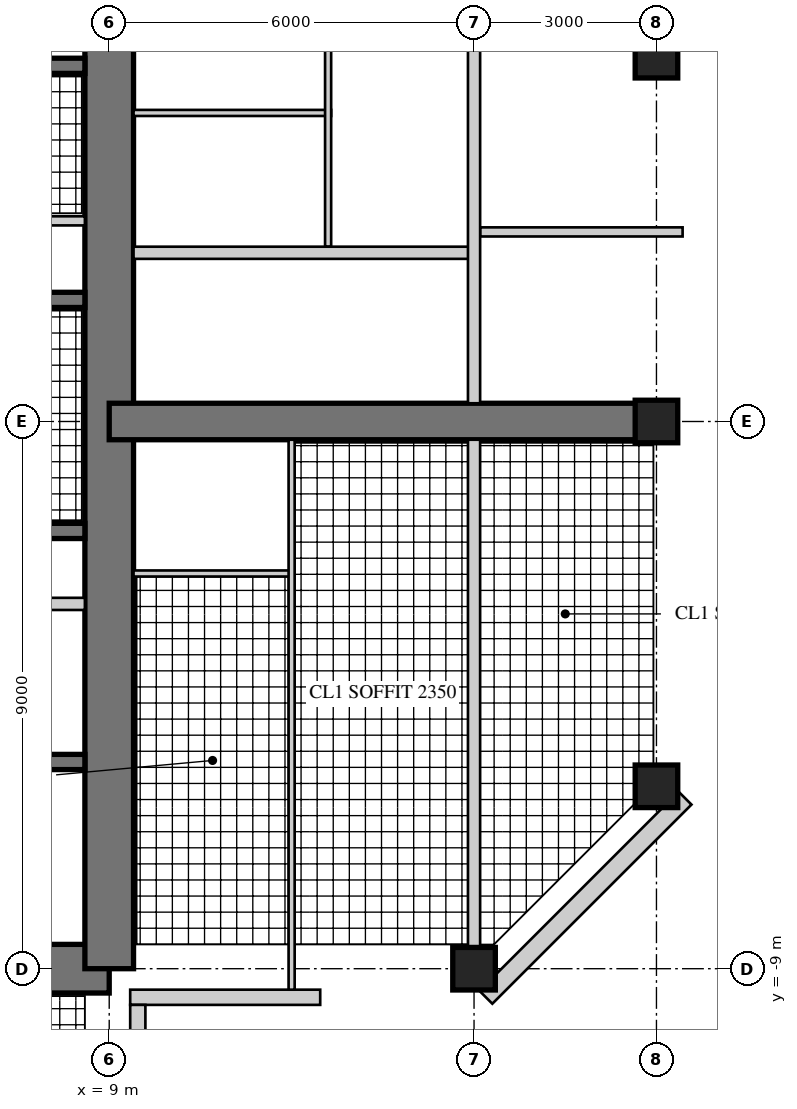
"""IFC4 building model, lengths in metres.
Left out: names, types, materials, properties, quantities, classifications, styles, units other than length and angle.
Written with IfcOpenShell. Run it as: python <this file> out.ifc"""

import sys

from ifc_helpers import new_model, si_unit, direction, frame, frame_2d, origin, origin_2d, place, context, subcontext, project, spatial, rectangle, hollow_rectangle, extrude, element, fill, save


model = new_model("IFC4")
c1 = context("Model", 3, precision=1e-05, world=origin(), true_north=direction((0.0, 1.0)))
c2 = subcontext(c1, "Body", "Model", "MODEL_VIEW")
j1 = project(units=[si_unit("LENGTHUNIT", "METRE"), si_unit("PLANEANGLEUNIT", "RADIAN")], contexts=[c1])
p1 = place(None, origin())
s1 = spatial("IfcSite", under=j1, at=p1, CompositionType="ELEMENT")
p2 = place(p1, origin())
s2 = spatial("IfcBuilding", under=s1, at=p2, CompositionType="ELEMENT")
p3 = place(p2, frame((0.0, 0.0, 278.1)))
s3 = spatial("IfcBuildingStorey", under=s2, at=p3, CompositionType="ELEMENT", Elevation=278.1)
p4 = place(p3, frame((-9.0, -9.0, 0.0), z_axis=(0.0, 0.0, 1.0), x_axis=(1.0, 0.0, 0.0)))
e1 = element("IfcWall", 1, at=p4, inside=s3, PredefinedType="SHEAR", context=c2, shape_type="SweptSolid", body=[
    extrude(rectangle(XDim=18.0, YDim=0.8, at=frame_2d((9.0, 0.0))), origin(), (0.0, 0.0, 1.0), 3.4),
])
p5 = place(p4, frame((9.8, 0.0, 0.0)))
e2 = element("IfcOpeningElement", 2, at=p5, cuts=e1, PredefinedType="OPENING", context=c2, shape_type="SweptSolid", body=[
    extrude(rectangle(XDim=1.0, YDim=2.4, at=frame_2d((0.5, 1.2))), frame((0.0, 0.41, 0.0), z_axis=(0.0, -1.0, 0.0), x_axis=(1.0, 0.0, 0.0)), (0.0, 0.0, 1.0), 0.82),
])
p6 = place(p3, frame((9.0, -9.0, 0.0), z_axis=(0.0, 0.0, 1.0), x_axis=(0.0, 1.0, 0.0)))
e3 = element("IfcWall", 3, at=p6, inside=s3, PredefinedType="SHEAR", context=c2, shape_type="SweptSolid", body=[
    extrude(rectangle(XDim=18.0, YDim=0.8, at=frame_2d((9.0, 0.0))), origin(), (0.0, 0.0, 1.0), 3.4),
])
p7 = place(p6, frame((9.8, 0.0, 0.0)))
e4 = element("IfcOpeningElement", 4, at=p7, cuts=e3, PredefinedType="OPENING", context=c2, shape_type="SweptSolid", body=[
    extrude(rectangle(XDim=1.0, YDim=2.4, at=frame_2d((0.5, 1.2))), frame((0.0, 0.41, 0.0), z_axis=(0.0, -1.0, 0.0), x_axis=(1.0, 0.0, 0.0)), (0.0, 0.0, 1.0), 0.82),
])
p8 = place(p3, frame((1.925, 2.0, 0.0), z_axis=(0.0, 0.0, 1.0), x_axis=(1.0, 0.0, 0.0)))
e5 = element("IfcWall", 5, at=p8, inside=s3, PredefinedType="SHEAR", context=c2, shape_type="SweptSolid", body=[
    extrude(rectangle(XDim=6.675, YDim=0.25, at=frame_2d((3.337, 0.0))), origin(), (0.0, 0.0, 1.0), 3.4),
])
p9 = place(p3, frame((1.925, 5.85, 0.0), z_axis=(0.0, 0.0, 1.0), x_axis=(1.0, 0.0, 0.0)))
e6 = element("IfcWall", 6, at=p9, inside=s3, PredefinedType="SHEAR", context=c2, shape_type="SweptSolid", body=[
    extrude(rectangle(XDim=6.675, YDim=0.25, at=frame_2d((3.337, 0.0))), origin(), (0.0, 0.0, 1.0), 3.4),
])
p10 = place(p9, frame((0.546, 0.0, 0.0)))
e7 = element("IfcOpeningElement", 7, at=p10, cuts=e6, PredefinedType="OPENING", context=c2, shape_type="SweptSolid", body=[
    extrude(rectangle(XDim=1.0, YDim=2.1, at=frame_2d((0.5, 1.05))), frame((0.0, 0.135, 0.0), z_axis=(0.0, -1.0, 0.0), x_axis=(1.0, 0.0, 0.0)), (0.0, 0.0, 1.0), 0.27),
])
p11 = place(p9, frame((5.129, 0.0, 0.0)))
e8 = element("IfcOpeningElement", 8, at=p11, cuts=e6, PredefinedType="OPENING", context=c2, shape_type="SweptSolid", body=[
    extrude(rectangle(XDim=1.0, YDim=2.1, at=frame_2d((0.5, 1.05))), frame((0.0, 0.135, 0.0), z_axis=(0.0, -1.0, 0.0), x_axis=(1.0, 0.0, 0.0)), (0.0, 0.0, 1.0), 0.27),
])
p12 = place(p3, frame((1.925, 3.3, 0.0), z_axis=(0.0, 0.0, 1.0), x_axis=(1.0, 0.0, 0.0)))
e9 = element("IfcWall", 9, at=p12, inside=s3, PredefinedType="PARTITIONING", context=c2, shape_type="SweptSolid", body=[
    extrude(rectangle(XDim=6.675, YDim=0.15, at=frame_2d((3.337, 0.0))), origin(), (0.0, 0.0, 1.0), 3.4),
])
p13 = place(p12, frame((0.075, 0.0, 0.0)))
e10 = element("IfcOpeningElement", 10, at=p13, cuts=e9, PredefinedType="OPENING", context=c2, shape_type="SweptSolid", body=[
    extrude(rectangle(XDim=0.8, YDim=2.1, at=frame_2d((0.4, 1.05))), frame((0.0, 0.085, 0.0), z_axis=(0.0, -1.0, 0.0), x_axis=(1.0, 0.0, 0.0)), (0.0, 0.0, 1.0), 0.17),
])
p14 = place(p12, frame((3.675, 0.0, 0.0)))
e11 = element("IfcOpeningElement", 11, at=p14, cuts=e9, PredefinedType="OPENING", context=c2, shape_type="SweptSolid", body=[
    extrude(rectangle(XDim=0.8, YDim=2.1, at=frame_2d((0.4, 1.05))), frame((0.0, 0.085, 0.0), z_axis=(0.0, -1.0, 0.0), x_axis=(1.0, 0.0, 0.0)), (0.0, 0.0, 1.0), 0.17),
])
p15 = place(p3, frame((2.125, -1.8, 0.0), z_axis=(0.0, 0.0, 1.0), x_axis=(1.0, 0.0, 0.0)))
e12 = element("IfcWall", 12, at=p15, inside=s3, PredefinedType="SHEAR", context=c2, shape_type="SweptSolid", body=[
    extrude(rectangle(XDim=6.475, YDim=0.25, at=frame_2d((3.238, 0.0))), origin(), (0.0, 0.0, 1.0), 3.4),
])
p16 = place(p3, frame((2.125, -5.6, 0.0), z_axis=(0.0, 0.0, 1.0), x_axis=(1.0, 0.0, 0.0)))
e13 = element("IfcWall", 13, at=p16, inside=s3, PredefinedType="SHEAR", context=c2, shape_type="SweptSolid", body=[
    extrude(rectangle(XDim=6.475, YDim=0.25, at=frame_2d((3.238, 0.0))), origin(), (0.0, 0.0, 1.0), 3.4),
])
p17 = place(p16, frame((0.175, 0.0, 0.0)))
e14 = element("IfcOpeningElement", 14, at=p17, cuts=e13, PredefinedType="OPENING", context=c2, shape_type="SweptSolid", body=[
    extrude(rectangle(XDim=1.0, YDim=2.1, at=frame_2d((0.5, 1.05))), frame((0.0, 0.135, 0.0), z_axis=(0.0, -1.0, 0.0), x_axis=(1.0, 0.0, 0.0)), (0.0, 0.0, 1.0), 0.27),
])
p18 = place(p3, frame((5.725, -3.0, 0.0), z_axis=(0.0, 0.0, 1.0), x_axis=(1.0, 0.0, 0.0)))
e15 = element("IfcWall", 15, at=p18, inside=s3, PredefinedType="PARTITIONING", context=c2, shape_type="SweptSolid", body=[
    extrude(rectangle(XDim=2.875, YDim=0.2, at=frame_2d((1.438, 0.0))), origin(), (0.0, 0.0, 1.0), 3.4),
])
p19 = place(p3, frame((9.0, 0.0, 0.0), z_axis=(0.0, 0.0, 1.0), x_axis=(1.0, 0.0, 0.0)))
e16 = element("IfcWall", 16, at=p19, inside=s3, PredefinedType="SHEAR", context=c2, shape_type="SweptSolid", body=[
    extrude(rectangle(XDim=9.0, YDim=0.6, at=frame_2d((4.5, 0.0))), origin(), (0.0, 0.0, 1.0), 3.4),
])
p20 = place(p19, frame((3.8, 0.0, 0.0)))
e17 = element("IfcOpeningElement", 17, at=p20, cuts=e16, PredefinedType="OPENING", context=c2, shape_type="SweptSolid", body=[
    extrude(rectangle(XDim=1.0, YDim=2.15, at=frame_2d((0.5, 1.075))), frame((0.0, 0.31, 0.0), z_axis=(0.0, -1.0, 0.0), x_axis=(1.0, 0.0, 0.0)), (0.0, 0.0, 1.0), 0.62),
])
p21 = place(p19, frame((7.0, 0.0, 0.0)))
e18 = element("IfcOpeningElement", 18, at=p21, cuts=e16, PredefinedType="OPENING", context=c2, shape_type="SweptSolid", body=[
    extrude(rectangle(XDim=1.0, YDim=2.2, at=frame_2d((0.5, 1.1))), frame((0.0, 0.31, 0.0), z_axis=(0.0, -1.0, 0.0), x_axis=(1.0, 0.0, 0.0)), (0.0, 0.0, 1.0), 0.62),
])
for number, where, z_axis, x_axis in (
    (19, (15.0, -9.0, 0.0), (0.0, 0.0, 1.0), (1.0, 0.0, 0.0)),
    (20, (18.0, -6.0, 0.0), (0.0, 0.0, 1.0), (1.0, 0.0, 0.0)),
    (21, (18.0, 0.0, 0.0), (0.0, 0.0, 1.0), (1.0, 0.0, 0.0)),
    (22, (18.0, 6.0, 0.0), (0.0, 0.0, 1.0), (1.0, 0.0, 0.0)),
):
    element("IfcColumn", number, at=place(p3, frame(where, z_axis=z_axis, x_axis=x_axis)), inside=s3, PredefinedType="COLUMN", context=c2, shape_type="SweptSolid", body=[
        extrude(rectangle(XDim=0.7, YDim=0.7, at=origin_2d()), origin(), (0.0, 0.0, 1.0), 3.4),
    ])
p22 = place(p3, frame((9.345, -9.47, 0.0), z_axis=(0.0, 0.0, 1.0), x_axis=(1.0, 0.0, 0.0)))
e23 = element("IfcWall", 23, at=p22, inside=s3, PredefinedType="SOLIDWALL", context=c2, shape_type="SweptSolid", body=[
    extrude(rectangle(XDim=3.125, YDim=0.25, at=frame_2d((1.562, 0.0))), origin(), (0.0, 0.0, 1.0), 3.22),
])
p23 = place(p22, frame((0.6, 0.0, 0.0)))
e24 = element("IfcOpeningElement", 24, at=p23, cuts=e23, PredefinedType="OPENING", context=c2, shape_type="SweptSolid", body=[
    extrude(rectangle(XDim=1.0, YDim=2.2, at=frame_2d((0.5, 1.1))), frame((0.0, 0.135, 0.0), z_axis=(0.0, -1.0, 0.0), x_axis=(1.0, 0.0, 0.0)), (0.0, 0.0, 1.0), 0.27),
])
p24 = place(p3, frame((15.195, -9.47, 0.0), z_axis=(0.0, 0.0, 1.0), x_axis=(0.707106781187, 0.707106781187, 0.0)))
e25 = element("IfcWall", 25, at=p24, inside=s3, PredefinedType="SOLIDWALL", context=c2, shape_type="SweptSolid", body=[
    extrude(rectangle(XDim=4.632, YDim=0.3, at=frame_2d((2.316, 0.0))), origin(), (0.0, 0.0, 1.0), 3.22),
])
p25 = place(p24, frame((1.866, 0.0, 0.3)))
e26 = element("IfcOpeningElement", 26, at=p25, cuts=e25, PredefinedType="OPENING", context=c2, shape_type="SweptSolid", body=[
    extrude(rectangle(XDim=0.9, YDim=2.4, at=frame_2d((0.45, 1.2))), frame((0.0, 0.16, 0.0), z_axis=(0.0, -1.0, 0.0), x_axis=(1.0, 0.0, 0.0)), (0.0, 0.0, 1.0), 0.32),
])
p26 = place(p3, frame((9.47, -12.47, 0.0), z_axis=(0.0, 0.0, 1.0), x_axis=(0.0, 1.0, 0.0)))
e27 = element("IfcWall", 27, at=p26, inside=s3, PredefinedType="SOLIDWALL", context=c2, shape_type="SweptSolid", body=[
    extrude(rectangle(XDim=2.875, YDim=0.25, at=frame_2d((1.438, 0.0))), origin(), (0.0, 0.0, 1.0), 3.22),
])
p27 = place(p26, frame((0.6, 0.0, 0.0)))
e28 = element("IfcOpeningElement", 28, at=p27, cuts=e27, PredefinedType="OPENING", context=c2, shape_type="SweptSolid", body=[
    extrude(rectangle(XDim=1.0, YDim=2.2, at=frame_2d((0.5, 1.1))), frame((0.0, 0.135, 0.0), z_axis=(0.0, -1.0, 0.0), x_axis=(1.0, 0.0, 0.0)), (0.0, 0.0, 1.0), 0.27),
])
p28 = place(p3, frame((9.4, 5.075, 0.0), z_axis=(0.0, 0.0, 1.0), x_axis=(1.0, 0.0, 0.0)))
e29 = element("IfcWall", 29, at=p28, inside=s3, PredefinedType="PARTITIONING", context=c2, shape_type="SweptSolid", body=[
    extrude(rectangle(XDim=3.25, YDim=0.1, at=frame_2d((1.625, 0.0))), origin(), (0.0, 0.0, 1.0), 3.22),
])
p29 = place(p3, frame((12.6, 2.875, 0.0), z_axis=(0.0, 0.0, 1.0), x_axis=(0.0, 1.0, 0.0)))
e30 = element("IfcWall", 30, at=p29, inside=s3, PredefinedType="PARTITIONING", context=c2, shape_type="SweptSolid", body=[
    extrude(rectangle(XDim=6.555, YDim=0.1, at=frame_2d((3.277, 0.0))), origin(), (0.0, 0.0, 1.0), 3.22),
])
p30 = place(p29, frame((0.55, 0.0, 0.0)))
e31 = element("IfcOpeningElement", 31, at=p30, cuts=e30, PredefinedType="OPENING", context=c2, shape_type="SweptSolid", body=[
    extrude(rectangle(XDim=0.9, YDim=2.1, at=frame_2d((0.45, 1.05))), frame((0.0, 0.06, 0.0), z_axis=(0.0, -1.0, 0.0), x_axis=(1.0, 0.0, 0.0)), (0.0, 0.0, 1.0), 0.12),
])
p31 = place(p29, frame((2.65, 0.0, 0.0)))
e32 = element("IfcOpeningElement", 32, at=p31, cuts=e30, PredefinedType="OPENING", context=c2, shape_type="SweptSolid", body=[
    extrude(rectangle(XDim=0.9, YDim=2.1, at=frame_2d((0.45, 1.05))), frame((0.0, 0.06, 0.0), z_axis=(0.0, -1.0, 0.0), x_axis=(1.0, 0.0, 0.0)), (0.0, 0.0, 1.0), 0.12),
])
p32 = place(p3, frame((9.4, -2.5, 0.0), z_axis=(0.0, 0.0, 1.0), x_axis=(1.0, 0.0, 0.0)))
e33 = element("IfcWall", 33, at=p32, inside=s3, PredefinedType="PARTITIONING", context=c2, shape_type="SweptSolid", body=[
    extrude(rectangle(XDim=2.65, YDim=0.1, at=frame_2d((1.325, 0.0))), origin(), (0.0, 0.0, 1.0), 3.22),
])
p33 = place(p3, frame((12.0, -9.345, 0.0), z_axis=(0.0, 0.0, 1.0), x_axis=(0.0, 1.0, 0.0)))
e34 = element("IfcWall", 34, at=p33, inside=s3, PredefinedType="PARTITIONING", context=c2, shape_type="SweptSolid", body=[
    extrude(rectangle(XDim=9.045, YDim=0.1, at=frame_2d((4.522, 0.0))), origin(), (0.0, 0.0, 1.0), 3.22),
])
p34 = place(p33, frame((5.495, 0.0, 0.0)))
e35 = element("IfcOpeningElement", 35, at=p34, cuts=e34, PredefinedType="OPENING", context=c2, shape_type="SweptSolid", body=[
    extrude(rectangle(XDim=0.9, YDim=2.1, at=frame_2d((0.45, 1.05))), frame((0.0, 0.06, 0.0), z_axis=(0.0, -1.0, 0.0), x_axis=(1.0, 0.0, 0.0)), (0.0, 0.0, 1.0), 0.12),
])
p35 = place(p33, frame((7.595, 0.0, 0.0)))
e36 = element("IfcOpeningElement", 36, at=p35, cuts=e34, PredefinedType="OPENING", context=c2, shape_type="SweptSolid", body=[
    extrude(rectangle(XDim=0.9, YDim=2.1, at=frame_2d((0.45, 1.05))), frame((0.0, 0.06, 0.0), z_axis=(0.0, -1.0, 0.0), x_axis=(1.0, 0.0, 0.0)), (0.0, 0.0, 1.0), 0.12),
])
p36 = place(p3, frame((9.4, 2.775, 0.0), z_axis=(0.0, 0.0, 1.0), x_axis=(1.0, 0.0, 0.0)))
e37 = element("IfcWall", 37, at=p36, inside=s3, PredefinedType="SOLIDWALL", context=c2, shape_type="SweptSolid", body=[
    extrude(rectangle(XDim=5.6, YDim=0.2, at=frame_2d((2.8, 0.0))), origin(), (0.0, 0.0, 1.0), 3.22),
])
p37 = place(p36, frame((3.75, 0.0, 0.0)))
e38 = element("IfcOpeningElement", 38, at=p37, cuts=e37, PredefinedType="OPENING", context=c2, shape_type="SweptSolid", body=[
    extrude(rectangle(XDim=1.0, YDim=2.15, at=frame_2d((0.5, 1.075))), frame((0.0, 0.11, 0.0), z_axis=(0.0, -1.0, 0.0), x_axis=(1.0, 0.0, 0.0)), (0.0, 0.0, 1.0), 0.22),
])
p38 = place(p3, frame((15.1, 3.118, 0.0), z_axis=(0.0, 0.0, 1.0), x_axis=(1.0, 0.0, 0.0)))
e39 = element("IfcWall", 39, at=p38, inside=s3, PredefinedType="PARTITIONING", context=c2, shape_type="SweptSolid", body=[
    extrude(rectangle(XDim=3.33, YDim=0.15, at=frame_2d((1.665, 0.0))), origin(), (0.0, 0.0, 1.0), 3.22),
])
p39 = place(p38, frame((0.6, 0.0, 0.0)))
e40 = element("IfcOpeningElement", 40, at=p39, cuts=e39, PredefinedType="OPENING", context=c2, shape_type="SweptSolid", body=[
    extrude(rectangle(XDim=1.0, YDim=2.1, at=frame_2d((0.5, 1.05))), frame((0.0, 0.085, 0.0), z_axis=(0.0, -1.0, 0.0), x_axis=(1.0, 0.0, 0.0)), (0.0, 0.0, 1.0), 0.17),
])
p40 = place(p3, frame((15.0, -8.65, 0.0), z_axis=(0.0, 0.0, 1.0), x_axis=(0.0, 1.0, 0.0)))
e41 = element("IfcWall", 41, at=p40, inside=s3, PredefinedType="SOLIDWALL", context=c2, shape_type="SweptSolid", body=[
    extrude(rectangle(XDim=8.35, YDim=0.2, at=frame_2d((4.175, 0.0))), origin(), (0.0, 0.0, 1.0), 2.52),
])
p41 = place(p3, frame((15.0, 0.3, 0.0), z_axis=(0.0, 0.0, 1.0), x_axis=(0.0, 1.0, 0.0)))
e42 = element("IfcWall", 42, at=p41, inside=s3, PredefinedType="SOLIDWALL", context=c2, shape_type="SweptSolid", body=[
    extrude(rectangle(XDim=8.35, YDim=0.2, at=frame_2d((4.175, 0.0))), origin(), (0.0, 0.0, 1.0), 2.52),
])
p42 = place(p41, frame((0.4, 0.0, 0.0)))
e43 = element("IfcOpeningElement", 43, at=p42, cuts=e42, PredefinedType="OPENING", context=c2, shape_type="SweptSolid", body=[
    extrude(rectangle(XDim=1.0, YDim=2.2, at=frame_2d((0.5, 1.1))), frame((0.0, 0.11, 0.0), z_axis=(0.0, -1.0, 0.0), x_axis=(1.0, 0.0, 0.0)), (0.0, 0.0, 1.0), 0.22),
])
p43 = place(p23, origin())
e44 = element("IfcDoor", 44, at=p43, inside=s3, OperationType="SINGLE_SWING_LEFT", PredefinedType="DOOR", context=c2, shape_type="SweptSolid", body=[
    extrude(hollow_rectangle(XDim=1.0, YDim=2.2, WallThickness=0.06, at=frame_2d((0.5, 1.1))), frame((0.0, 0.025, 0.0), z_axis=(0.0, -1.0, 0.0), x_axis=(1.0, 0.0, 0.0)), (0.0, 0.0, 1.0), 0.05),
    extrude(rectangle(XDim=0.879, YDim=2.079, at=frame_2d((0.5, 1.1))), frame((0.0, 0.025, 0.0), z_axis=(0.0, -1.0, 0.0), x_axis=(1.0, 0.0, 0.0)), (0.0, 0.0, 1.0), 0.05),
])
fill(e24, e44)
p44 = place(p25, origin())
e45 = element("IfcWindow", 45, at=p44, inside=s3, PartitioningType="SINGLE_PANEL", PredefinedType="WINDOW", context=c2, shape_type="SweptSolid", body=[
    extrude(hollow_rectangle(XDim=0.9, YDim=2.4, WallThickness=0.06, at=frame_2d((0.45, 1.2))), frame((0.0, 0.03, 0.0), z_axis=(0.0, -1.0, 0.0), x_axis=(1.0, 0.0, 0.0)), (0.0, 0.0, 1.0), 0.06),
    extrude(rectangle(XDim=0.779, YDim=2.279, at=frame_2d((0.45, 1.2))), frame((0.0, 0.03, 0.0), z_axis=(0.0, -1.0, 0.0), x_axis=(1.0, 0.0, 0.0)), (0.0, 0.0, 1.0), 0.06),
])
fill(e26, e45)
p45 = place(p30, origin())
e46 = element("IfcDoor", 46, at=p45, inside=s3, OperationType="SINGLE_SWING_LEFT", PredefinedType="DOOR", context=c2, shape_type="SweptSolid", body=[
    extrude(rectangle(XDim=0.9, YDim=2.1, at=frame_2d((0.45, 1.05))), frame((0.0, 0.025, 0.0), z_axis=(0.0, -1.0, 0.0), x_axis=(1.0, 0.0, 0.0)), (0.0, 0.0, 1.0), 0.05),
])
fill(e31, e46)
p46 = place(p31, origin())
e47 = element("IfcDoor", 47, at=p46, inside=s3, OperationType="SINGLE_SWING_LEFT", PredefinedType="DOOR", context=c2, shape_type="SweptSolid", body=[
    extrude(rectangle(XDim=0.9, YDim=2.1, at=frame_2d((0.45, 1.05))), frame((0.0, 0.025, 0.0), z_axis=(0.0, -1.0, 0.0), x_axis=(1.0, 0.0, 0.0)), (0.0, 0.0, 1.0), 0.05),
])
fill(e32, e47)
p47 = place(p34, origin())
e48 = element("IfcDoor", 48, at=p47, inside=s3, OperationType="SINGLE_SWING_RIGHT", PredefinedType="DOOR", context=c2, shape_type="SweptSolid", body=[
    extrude(rectangle(XDim=0.9, YDim=2.1, at=frame_2d((0.45, 1.05))), frame((0.0, 0.025, 0.0), z_axis=(0.0, -1.0, 0.0), x_axis=(1.0, 0.0, 0.0)), (0.0, 0.0, 1.0), 0.05),
])
fill(e35, e48)
p48 = place(p35, origin())
e49 = element("IfcDoor", 49, at=p48, inside=s3, OperationType="SINGLE_SWING_RIGHT", PredefinedType="DOOR", context=c2, shape_type="SweptSolid", body=[
    extrude(rectangle(XDim=0.9, YDim=2.1, at=frame_2d((0.45, 1.05))), frame((0.0, 0.025, 0.0), z_axis=(0.0, -1.0, 0.0), x_axis=(1.0, 0.0, 0.0)), (0.0, 0.0, 1.0), 0.05),
])
fill(e36, e49)
p49 = place(p37, origin())
e50 = element("IfcDoor", 50, at=p49, inside=s3, OperationType="SINGLE_SWING_LEFT", PredefinedType="DOOR", context=c2, shape_type="SweptSolid", body=[
    extrude(rectangle(XDim=1.0, YDim=2.15, at=frame_2d((0.5, 1.075))), frame((0.0, 0.025, 0.0), z_axis=(0.0, -1.0, 0.0), x_axis=(1.0, 0.0, 0.0)), (0.0, 0.0, 1.0), 0.05),
])
fill(e38, e50)
p50 = place(p39, frame((1.0, 0.0, 0.0), z_axis=(0.0, 0.0, 1.0), x_axis=(-1.0, 0.0, 0.0)))
e51 = element("IfcDoor", 51, at=p50, inside=s3, OperationType="SINGLE_SWING_RIGHT", PredefinedType="DOOR", context=c2, shape_type="SweptSolid", body=[
    extrude(rectangle(XDim=1.0, YDim=2.1, at=frame_2d((0.5, 1.05))), frame((0.0, 0.025, 0.0), z_axis=(0.0, -1.0, 0.0), x_axis=(1.0, 0.0, 0.0)), (0.0, 0.0, 1.0), 0.05),
])
fill(e40, e51)
p51 = place(p42, frame((1.0, 0.0, 0.0), z_axis=(0.0, 0.0, 1.0), x_axis=(-1.0, 0.0, 0.0)))
e52 = element("IfcDoor", 52, at=p51, inside=s3, OperationType="SINGLE_SWING_LEFT", PredefinedType="DOOR", context=c2, shape_type="SweptSolid", body=[
    extrude(rectangle(XDim=1.0, YDim=2.2, at=frame_2d((0.5, 1.1))), frame((0.0, 0.025, 0.0), z_axis=(0.0, -1.0, 0.0), x_axis=(1.0, 0.0, 0.0)), (0.0, 0.0, 1.0), 0.05),
])
fill(e43, e52)
p52 = place(p20, frame((1.0, 0.0, 0.0), z_axis=(0.0, 0.0, 1.0), x_axis=(-1.0, 0.0, 0.0)))
e53 = element("IfcDoor", 53, at=p52, inside=s3, OperationType="SINGLE_SWING_RIGHT", PredefinedType="DOOR", context=c2, shape_type="SweptSolid", body=[
    extrude(rectangle(XDim=1.0, YDim=2.15, at=frame_2d((0.5, 1.075))), frame((0.0, 0.025, 0.0), z_axis=(0.0, -1.0, 0.0), x_axis=(1.0, 0.0, 0.0)), (0.0, 0.0, 1.0), 0.05),
])
fill(e17, e53)
p53 = place(p21, origin())
e54 = element("IfcDoor", 54, at=p53, inside=s3, OperationType="SINGLE_SWING_LEFT", PredefinedType="DOOR", context=c2, shape_type="SweptSolid", body=[
    extrude(rectangle(XDim=1.0, YDim=2.2, at=frame_2d((0.5, 1.1))), frame((0.0, 0.025, 0.0), z_axis=(0.0, -1.0, 0.0), x_axis=(1.0, 0.0, 0.0)), (0.0, 0.0, 1.0), 0.05),
])
fill(e18, e54)
p54 = place(p7, origin())
e55 = element("IfcDoor", 55, at=p54, inside=s3, OperationType="SINGLE_SWING_RIGHT", PredefinedType="DOOR", context=c2, shape_type="SweptSolid", body=[
    extrude(rectangle(XDim=1.0, YDim=2.4, at=frame_2d((0.5, 1.2))), frame((0.0, 0.055, 0.0), z_axis=(0.0, -1.0, 0.0), x_axis=(1.0, 0.0, 0.0)), (0.0, 0.0, 1.0), 0.05),
])
fill(e4, e55)
save(model, sys.argv[1])
